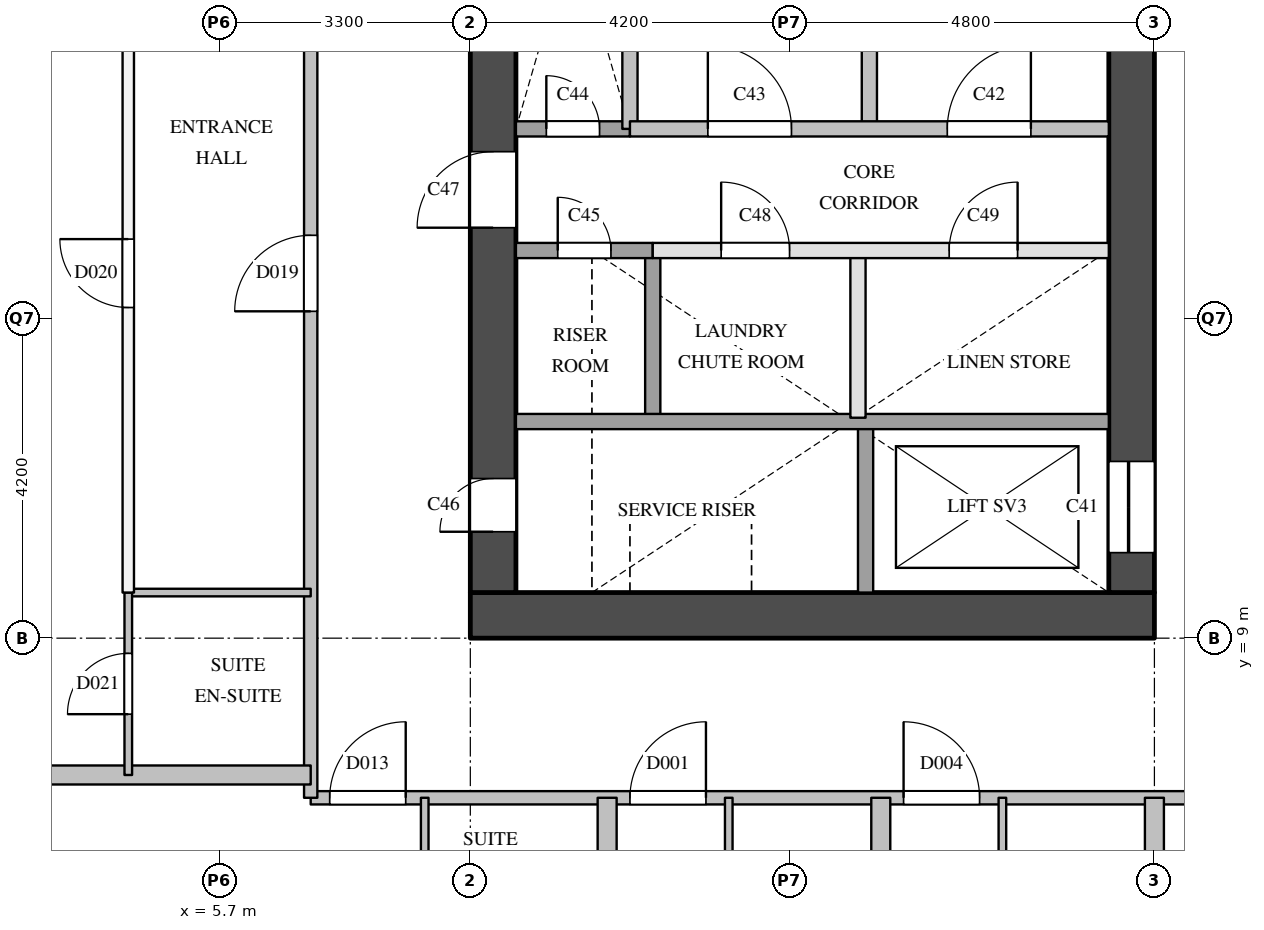
"""IFC4 building model, lengths in metres.
Left out: names, types, materials, properties, quantities, classifications, styles, units other than length and angle.
Written with IfcOpenShell. Run it as: python <this file> out.ifc"""

import sys

from ifc_helpers import new_model, si_unit, direction, frame, frame_2d, origin, place, context, subcontext, project, spatial, rectangle, extrude, element, fill, save


model = new_model("IFC4")
c1 = context("Model", 3, precision=1e-05, world=origin(), true_north=direction((0.0, 1.0)))
c2 = subcontext(c1, "Body", "Model", "MODEL_VIEW")
j1 = project(units=[si_unit("LENGTHUNIT", "METRE"), si_unit("PLANEANGLEUNIT", "RADIAN")], contexts=[c1])
p1 = place(None, origin())
s1 = spatial("IfcSite", under=j1, at=p1, CompositionType="ELEMENT")
p2 = place(p1, origin())
s2 = spatial("IfcBuilding", under=s1, at=p2, CompositionType="ELEMENT")
p3 = place(p2, frame((0.0, 0.0, 69.0)))
s3 = spatial("IfcBuildingStorey", under=s2, at=p3, CompositionType="ELEMENT", Elevation=69.0)
p4 = place(p3, frame((9.0, 9.3, 0.0), z_axis=(0.0, 0.0, 1.0), x_axis=(1.0, 0.0, 0.0)))
e1 = element("IfcWall", 1, at=p4, inside=s3, PredefinedType="SHEAR", context=c2, shape_type="SweptSolid", body=[
    extrude(rectangle(XDim=9.0, YDim=0.6, at=frame_2d((4.5, 0.0))), origin(), (0.0, 0.0, 1.0), 3.5),
])
p5 = place(p3, frame((9.3, 9.6, 0.0), z_axis=(0.0, 0.0, 1.0), x_axis=(0.0, 1.0, 0.0)))
e2 = element("IfcWall", 2, at=p5, inside=s3, PredefinedType="SHEAR", context=c2, shape_type="SweptSolid", body=[
    extrude(rectangle(XDim=12.3, YDim=0.6, at=frame_2d((6.15, 0.0))), origin(), (0.0, 0.0, 1.0), 3.5),
])
p6 = place(p5, frame((0.8, 0.0, 0.0)))
e3 = element("IfcOpeningElement", 3, at=p6, cuts=e2, PredefinedType="OPENING", context=c2, shape_type="SweptSolid", body=[
    extrude(rectangle(XDim=0.7, YDim=2.1, at=frame_2d((0.35, 1.05))), frame((0.0, 0.31, 0.0), z_axis=(0.0, -1.0, 0.0), x_axis=(1.0, 0.0, 0.0)), (0.0, 0.0, 1.0), 0.62),
])
p7 = place(p5, frame((4.8, 0.0, 0.0)))
e4 = element("IfcOpeningElement", 4, at=p7, cuts=e2, PredefinedType="OPENING", context=c2, shape_type="SweptSolid", body=[
    extrude(rectangle(XDim=1.0, YDim=2.1, at=frame_2d((0.5, 1.05))), frame((0.0, 0.31, 0.0), z_axis=(0.0, -1.0, 0.0), x_axis=(1.0, 0.0, 0.0)), (0.0, 0.0, 1.0), 0.62),
])
p8 = place(p3, frame((17.7, 9.6, 0.0), z_axis=(0.0, 0.0, 1.0), x_axis=(0.0, 1.0, 0.0)))
e5 = element("IfcWall", 5, at=p8, inside=s3, PredefinedType="SHEAR", context=c2, shape_type="SweptSolid", body=[
    extrude(rectangle(XDim=12.3, YDim=0.6, at=frame_2d((6.15, 0.0))), origin(), (0.0, 0.0, 1.0), 3.5),
])
p9 = place(p8, frame((0.525, 0.0, 0.0)))
e6 = element("IfcOpeningElement", 6, at=p9, cuts=e5, PredefinedType="OPENING", context=c2, shape_type="SweptSolid", body=[
    extrude(rectangle(XDim=1.2, YDim=2.1, at=frame_2d((0.6, 1.05))), frame((0.0, 0.31, 0.0), z_axis=(0.0, -1.0, 0.0), x_axis=(1.0, 0.0, 0.0)), (0.0, 0.0, 1.0), 0.62),
])
p10 = place(p3, frame((11.1, 15.7, 0.0), z_axis=(0.0, 0.0, 1.0), x_axis=(0.0, 1.0, 0.0)))
e7 = element("IfcWall", 7, at=p10, inside=s3, PredefinedType="SOLIDWALL", context=c2, shape_type="SweptSolid", body=[
    extrude(rectangle(XDim=4.3, YDim=0.2, at=frame_2d((2.15, 0.0))), origin(), (0.0, 0.0, 1.0), 3.5),
])
p11 = place(p3, frame((11.4, 11.9, 0.0), z_axis=(0.0, 0.0, 1.0), x_axis=(0.0, 1.0, 0.0)))
e8 = element("IfcWall", 8, at=p11, inside=s3, PredefinedType="SOLIDWALL", context=c2, shape_type="SweptSolid", body=[
    extrude(rectangle(XDim=2.2, YDim=0.2, at=frame_2d((1.1, 0.0))), origin(), (0.0, 0.0, 1.0), 3.5),
])
p12 = place(p3, frame((14.1, 11.9, 0.0), z_axis=(0.0, 0.0, 1.0), x_axis=(0.0, 1.0, 0.0)))
e9 = element("IfcWall", 9, at=p12, inside=s3, PredefinedType="PARTITIONING", context=c2, shape_type="SweptSolid", body=[
    extrude(rectangle(XDim=2.2, YDim=0.2, at=frame_2d((1.1, 0.0))), origin(), (0.0, 0.0, 1.0), 3.5),
])
p13 = place(p3, frame((14.2, 9.6, 0.0), z_axis=(0.0, 0.0, 1.0), x_axis=(0.0, 1.0, 0.0)))
e10 = element("IfcWall", 10, at=p13, inside=s3, PredefinedType="SOLIDWALL", context=c2, shape_type="SweptSolid", body=[
    extrude(rectangle(XDim=2.3, YDim=0.2, at=frame_2d((1.15, 0.0))), origin(), (0.0, 0.0, 1.0), 3.5),
])
p14 = place(p3, frame((14.25, 15.7, 0.0), z_axis=(0.0, 0.0, 1.0), x_axis=(0.0, 1.0, 0.0)))
e11 = element("IfcWall", 11, at=p14, inside=s3, PredefinedType="SOLIDWALL", context=c2, shape_type="SweptSolid", body=[
    extrude(rectangle(XDim=4.3, YDim=0.2, at=frame_2d((2.15, 0.0))), origin(), (0.0, 0.0, 1.0), 3.5),
])
p15 = place(p3, frame((9.6, 11.85, 0.0), z_axis=(0.0, 0.0, 1.0), x_axis=(1.0, 0.0, 0.0)))
e12 = element("IfcWall", 12, at=p15, inside=s3, PredefinedType="SOLIDWALL", context=c2, shape_type="SweptSolid", body=[
    extrude(rectangle(XDim=7.8, YDim=0.2, at=frame_2d((3.9, 0.0))), origin(), (0.0, 0.0, 1.0), 3.5),
])
p16 = place(p3, frame((11.4, 14.1, 0.0), z_axis=(0.0, 0.0, 1.0), x_axis=(1.0, 0.0, 0.0)))
e13 = element("IfcWall", 13, at=p16, inside=s3, PredefinedType="PARTITIONING", context=c2, shape_type="SweptSolid", body=[
    extrude(rectangle(XDim=6.0, YDim=0.2, at=frame_2d((3.0, 0.0))), origin(), (0.0, 0.0, 1.0), 3.5),
])
p17 = place(p16, frame((0.9, 0.0, 0.0)))
e14 = element("IfcOpeningElement", 14, at=p17, cuts=e13, PredefinedType="OPENING", context=c2, shape_type="SweptSolid", body=[
    extrude(rectangle(XDim=0.9, YDim=2.1, at=frame_2d((0.45, 1.05))), frame((0.0, 0.11, 0.0), z_axis=(0.0, -1.0, 0.0), x_axis=(1.0, 0.0, 0.0)), (0.0, 0.0, 1.0), 0.22),
])
p18 = place(p16, frame((3.9, 0.0, 0.0)))
e15 = element("IfcOpeningElement", 15, at=p18, cuts=e13, PredefinedType="OPENING", context=c2, shape_type="SweptSolid", body=[
    extrude(rectangle(XDim=0.9, YDim=2.1, at=frame_2d((0.45, 1.05))), frame((0.0, 0.11, 0.0), z_axis=(0.0, -1.0, 0.0), x_axis=(1.0, 0.0, 0.0)), (0.0, 0.0, 1.0), 0.22),
])
p19 = place(p3, frame((9.6, 14.1, 0.0), z_axis=(0.0, 0.0, 1.0), x_axis=(1.0, 0.0, 0.0)))
e16 = element("IfcWall", 16, at=p19, inside=s3, PredefinedType="SOLIDWALL", context=c2, shape_type="SweptSolid", body=[
    extrude(rectangle(XDim=1.8, YDim=0.2, at=frame_2d((0.9, 0.0))), origin(), (0.0, 0.0, 1.0), 3.5),
])
p20 = place(p19, frame((0.55, 0.0, 0.0)))
e17 = element("IfcOpeningElement", 17, at=p20, cuts=e16, PredefinedType="OPENING", context=c2, shape_type="SweptSolid", body=[
    extrude(rectangle(XDim=0.7, YDim=2.1, at=frame_2d((0.35, 1.05))), frame((0.0, 0.11, 0.0), z_axis=(0.0, -1.0, 0.0), x_axis=(1.0, 0.0, 0.0)), (0.0, 0.0, 1.0), 0.22),
])
p21 = place(p3, frame((9.6, 15.7, 0.0), z_axis=(0.0, 0.0, 1.0), x_axis=(1.0, 0.0, 0.0)))
e18 = element("IfcWall", 18, at=p21, inside=s3, PredefinedType="SOLIDWALL", context=c2, shape_type="SweptSolid", body=[
    extrude(rectangle(XDim=1.5, YDim=0.2, at=frame_2d((0.75, 0.0))), origin(), (0.0, 0.0, 1.0), 3.5),
])
p22 = place(p21, frame((0.4, 0.0, 0.0)))
e19 = element("IfcOpeningElement", 19, at=p22, cuts=e18, PredefinedType="OPENING", context=c2, shape_type="SweptSolid", body=[
    extrude(rectangle(XDim=0.7, YDim=2.1, at=frame_2d((0.35, 1.05))), frame((0.0, 0.11, 0.0), z_axis=(0.0, -1.0, 0.0), x_axis=(1.0, 0.0, 0.0)), (0.0, 0.0, 1.0), 0.22),
])
p23 = place(p3, frame((11.1, 15.7, 0.0), z_axis=(0.0, 0.0, 1.0), x_axis=(1.0, 0.0, 0.0)))
e20 = element("IfcWall", 20, at=p23, inside=s3, PredefinedType="SOLIDWALL", context=c2, shape_type="SweptSolid", body=[
    extrude(rectangle(XDim=6.3, YDim=0.2, at=frame_2d((3.15, 0.0))), origin(), (0.0, 0.0, 1.0), 3.5),
])
p24 = place(p23, frame((4.175, 0.0, 0.0)))
e21 = element("IfcOpeningElement", 21, at=p24, cuts=e20, PredefinedType="OPENING", context=c2, shape_type="SweptSolid", body=[
    extrude(rectangle(XDim=1.1, YDim=2.1, at=frame_2d((0.55, 1.05))), frame((0.0, 0.11, 0.0), z_axis=(0.0, -1.0, 0.0), x_axis=(1.0, 0.0, 0.0)), (0.0, 0.0, 1.0), 0.22),
])
p25 = place(p23, frame((1.025, 0.0, 0.0)))
e22 = element("IfcOpeningElement", 22, at=p25, cuts=e20, PredefinedType="OPENING", context=c2, shape_type="SweptSolid", body=[
    extrude(rectangle(XDim=1.1, YDim=2.1, at=frame_2d((0.55, 1.05))), frame((0.0, 0.11, 0.0), z_axis=(0.0, -1.0, 0.0), x_axis=(1.0, 0.0, 0.0)), (0.0, 0.0, 1.0), 0.22),
])
p26 = place(p3, frame((6.9, 6.9, 0.0), z_axis=(0.0, 0.0, 1.0), x_axis=(1.0, 0.0, 0.0)))
e23 = element("IfcWall", 23, at=p26, inside=s3, PredefinedType="PARTITIONING", context=c2, shape_type="SweptSolid", body=[
    extrude(rectangle(XDim=13.2, YDim=0.175, at=frame_2d((6.6, 0.0))), origin(), (0.0, 0.0, 1.0), 3.5),
])
p27 = place(p26, frame((4.2, 0.0, 0.0)))
e24 = element("IfcOpeningElement", 24, at=p27, cuts=e23, PredefinedType="OPENING", context=c2, shape_type="SweptSolid", body=[
    extrude(rectangle(XDim=1.0, YDim=2.1, at=frame_2d((0.5, 1.05))), frame((0.0, 0.097, 0.0), z_axis=(0.0, -1.0, 0.0), x_axis=(1.0, 0.0, 0.0)), (0.0, 0.0, 1.0), 0.195),
])
p28 = place(p26, frame((7.8, 0.0, 0.0)))
e25 = element("IfcOpeningElement", 25, at=p28, cuts=e23, PredefinedType="OPENING", context=c2, shape_type="SweptSolid", body=[
    extrude(rectangle(XDim=1.0, YDim=2.1, at=frame_2d((0.5, 1.05))), frame((0.0, 0.097, 0.0), z_axis=(0.0, -1.0, 0.0), x_axis=(1.0, 0.0, 0.0)), (0.0, 0.0, 1.0), 0.195),
])
p29 = place(p26, frame((11.65, 0.0, 0.0)))
e26 = element("IfcOpeningElement", 26, at=p29, cuts=e23, PredefinedType="OPENING", context=c2, shape_type="SweptSolid", body=[
    extrude(rectangle(XDim=1.0, YDim=2.1, at=frame_2d((0.5, 1.05))), frame((0.0, 0.097, 0.0), z_axis=(0.0, -1.0, 0.0), x_axis=(1.0, 0.0, 0.0)), (0.0, 0.0, 1.0), 0.195),
])
p30 = place(p26, frame((0.25, 0.0, 0.0)))
e27 = element("IfcOpeningElement", 27, at=p30, cuts=e23, PredefinedType="OPENING", context=c2, shape_type="SweptSolid", body=[
    extrude(rectangle(XDim=1.0, YDim=2.1, at=frame_2d((0.5, 1.05))), frame((0.0, 0.097, 0.0), z_axis=(0.0, -1.0, 0.0), x_axis=(1.0, 0.0, 0.0)), (0.0, 0.0, 1.0), 0.195),
])
p31 = place(p3, frame((6.9, 6.9, 0.0), z_axis=(0.0, 0.0, 1.0), x_axis=(0.0, 1.0, 0.0)))
e28 = element("IfcWall", 28, at=p31, inside=s3, PredefinedType="PARTITIONING", context=c2, shape_type="SweptSolid", body=[
    extrude(rectangle(XDim=17.09, YDim=0.175, at=frame_2d((8.545, 0.0))), origin(), (0.0, 0.0, 1.0), 3.5),
])
p32 = place(p31, frame((6.4, 0.0, 0.0)))
e29 = element("IfcOpeningElement", 29, at=p32, cuts=e28, PredefinedType="OPENING", context=c2, shape_type="SweptSolid", body=[
    extrude(rectangle(XDim=1.0, YDim=2.1, at=frame_2d((0.5, 1.05))), frame((0.0, 0.097, 0.0), z_axis=(0.0, -1.0, 0.0), x_axis=(1.0, 0.0, 0.0)), (0.0, 0.0, 1.0), 0.195),
])
p33 = place(p31, frame((14.795, 0.0, 0.0)))
e30 = element("IfcOpeningElement", 30, at=p33, cuts=e28, PredefinedType="OPENING", context=c2, shape_type="SweptSolid", body=[
    extrude(rectangle(XDim=1.0, YDim=2.1, at=frame_2d((0.5, 1.05))), frame((0.0, 0.097, 0.0), z_axis=(0.0, -1.0, 0.0), x_axis=(1.0, 0.0, 0.0)), (0.0, 0.0, 1.0), 0.195),
])
p34 = place(p3, frame((4.5, 9.6, 0.0), z_axis=(0.0, 0.0, 1.0), x_axis=(0.0, 1.0, 0.0)))
e31 = element("IfcWall", 31, at=p34, inside=s3, PredefinedType="PARTITIONING", context=c2, shape_type="SweptSolid", body=[
    extrude(rectangle(XDim=8.4, YDim=0.15, at=frame_2d((4.2, 0.0))), origin(), (0.0, 0.0, 1.0), 3.5),
])
p35 = place(p34, frame((3.75, 0.0, 0.0)))
e32 = element("IfcOpeningElement", 32, at=p35, cuts=e31, PredefinedType="OPENING", context=c2, shape_type="SweptSolid", body=[
    extrude(rectangle(XDim=0.9, YDim=2.1, at=frame_2d((0.45, 1.05))), frame((0.0, 0.085, 0.0), z_axis=(0.0, -1.0, 0.0), x_axis=(1.0, 0.0, 0.0)), (0.0, 0.0, 1.0), 0.17),
])
for number, where, z_axis, x_axis in (
    (33, (0.0, 7.2, 0.0), (0.0, 0.0, 1.0), (1.0, 0.0, 0.0)),
    (34, (10.8, 0.0, 0.0), (0.0, 0.0, 1.0), (0.0, 1.0, 0.0)),
    (35, (14.4, 0.0, 0.0), (0.0, 0.0, 1.0), (0.0, 1.0, 0.0)),
):
    element("IfcWall", number, at=place(p3, frame(where, z_axis=z_axis, x_axis=x_axis)), inside=s3, PredefinedType="PARTITIONING", context=c2, shape_type="SweptSolid", body=[
        extrude(rectangle(XDim=6.9, YDim=0.25, at=frame_2d((3.45, 0.0))), origin(), (0.0, 0.0, 1.0), 2.5),
    ])
p36 = place(p3, frame((18.0, 0.0, 0.0), z_axis=(0.0, 0.0, 1.0), x_axis=(0.0, 1.0, 0.0)))
e36 = element("IfcWall", 36, at=p36, inside=s3, PredefinedType="PARTITIONING", context=c2, shape_type="SweptSolid", body=[
    extrude(rectangle(XDim=6.9, YDim=0.25, at=frame_2d((3.45, 0.0))), origin(), (0.0, 0.0, 1.0), 3.5),
])
p37 = place(p3, frame((4.5, 9.6, 0.0), z_axis=(0.0, 0.0, 1.0), x_axis=(1.0, 0.0, 0.0)))
e37 = element("IfcWall", 37, at=p37, inside=s3, PredefinedType="PARTITIONING", context=c2, shape_type="SweptSolid", body=[
    extrude(rectangle(XDim=2.4, YDim=0.1, at=frame_2d((1.2, 0.0))), origin(), (0.0, 0.0, 1.0), 3.5),
])
p38 = place(p3, frame((4.5, 7.2, 0.0), z_axis=(0.0, 0.0, 1.0), x_axis=(0.0, 1.0, 0.0)))
e38 = element("IfcWall", 38, at=p38, inside=s3, PredefinedType="PARTITIONING", context=c2, shape_type="SweptSolid", body=[
    extrude(rectangle(XDim=2.4, YDim=0.1, at=frame_2d((1.2, 0.0))), origin(), (0.0, 0.0, 1.0), 3.5),
])
p39 = place(p38, frame((0.8, 0.0, 0.0)))
e39 = element("IfcOpeningElement", 39, at=p39, cuts=e38, PredefinedType="OPENING", context=c2, shape_type="SweptSolid", body=[
    extrude(rectangle(XDim=0.8, YDim=2.1, at=frame_2d((0.4, 1.05))), frame((0.0, 0.06, 0.0), z_axis=(0.0, -1.0, 0.0), x_axis=(1.0, 0.0, 0.0)), (0.0, 0.0, 1.0), 0.12),
])
p40 = place(p3, frame((8.4, 4.8, 0.0), z_axis=(0.0, 0.0, 1.0), x_axis=(0.0, 1.0, 0.0)))
e40 = element("IfcWall", 40, at=p40, inside=s3, PredefinedType="PARTITIONING", context=c2, shape_type="SweptSolid", body=[
    extrude(rectangle(XDim=2.1, YDim=0.1, at=frame_2d((1.05, 0.0))), origin(), (0.0, 0.0, 1.0), 3.5),
])
for number, where, z_axis, x_axis in (
    (41, (12.4, 4.5, 0.0), (0.0, 0.0, 1.0), (0.0, 1.0, 0.0)),
    (42, (16.0, 4.5, 0.0), (0.0, 0.0, 1.0), (0.0, 1.0, 0.0)),
):
    element("IfcWall", number, at=place(p3, frame(where, z_axis=z_axis, x_axis=x_axis)), inside=s3, PredefinedType="PARTITIONING", context=c2, shape_type="SweptSolid", body=[
        extrude(rectangle(XDim=2.4, YDim=0.1, at=frame_2d((1.2, 0.0))), origin(), (0.0, 0.0, 1.0), 3.5),
    ])
p41 = place(p9, origin())
e43 = element("IfcDoor", 43, at=p41, inside=s3, OperationType="SLIDING_TO_LEFT", PredefinedType="DOOR", context=c2, shape_type="SweptSolid", body=[
    extrude(rectangle(XDim=1.2, YDim=2.1, at=frame_2d((0.6, 1.05))), frame((0.0, 0.025, 0.0), z_axis=(0.0, -1.0, 0.0), x_axis=(1.0, 0.0, 0.0)), (0.0, 0.0, 1.0), 0.05),
])
fill(e6, e43)
p42 = place(p24, origin())
e44 = element("IfcDoor", 44, at=p42, inside=s3, OperationType="SINGLE_SWING_RIGHT", PredefinedType="DOOR", context=c2, shape_type="SweptSolid", body=[
    extrude(rectangle(XDim=1.1, YDim=2.1, at=frame_2d((0.55, 1.05))), frame((0.0, 0.025, 0.0), z_axis=(0.0, -1.0, 0.0), x_axis=(1.0, 0.0, 0.0)), (0.0, 0.0, 1.0), 0.05),
])
fill(e21, e44)
p43 = place(p25, origin())
e45 = element("IfcDoor", 45, at=p43, inside=s3, OperationType="SINGLE_SWING_LEFT", PredefinedType="DOOR", context=c2, shape_type="SweptSolid", body=[
    extrude(rectangle(XDim=1.1, YDim=2.1, at=frame_2d((0.55, 1.05))), frame((0.0, 0.025, 0.0), z_axis=(0.0, -1.0, 0.0), x_axis=(1.0, 0.0, 0.0)), (0.0, 0.0, 1.0), 0.05),
])
fill(e22, e45)
p44 = place(p22, origin())
e46 = element("IfcDoor", 46, at=p44, inside=s3, OperationType="SINGLE_SWING_LEFT", PredefinedType="DOOR", context=c2, shape_type="SweptSolid", body=[
    extrude(rectangle(XDim=0.7, YDim=2.1, at=frame_2d((0.35, 1.05))), frame((0.0, 0.025, 0.0), z_axis=(0.0, -1.0, 0.0), x_axis=(1.0, 0.0, 0.0)), (0.0, 0.0, 1.0), 0.05),
])
fill(e19, e46)
p45 = place(p20, origin())
e47 = element("IfcDoor", 47, at=p45, inside=s3, OperationType="SINGLE_SWING_LEFT", PredefinedType="DOOR", context=c2, shape_type="SweptSolid", body=[
    extrude(rectangle(XDim=0.7, YDim=2.1, at=frame_2d((0.35, 1.05))), frame((0.0, 0.025, 0.0), z_axis=(0.0, -1.0, 0.0), x_axis=(1.0, 0.0, 0.0)), (0.0, 0.0, 1.0), 0.05),
])
fill(e17, e47)
p46 = place(p6, origin())
e48 = element("IfcDoor", 48, at=p46, inside=s3, OperationType="SINGLE_SWING_LEFT", PredefinedType="DOOR", context=c2, shape_type="SweptSolid", body=[
    extrude(rectangle(XDim=0.7, YDim=2.1, at=frame_2d((0.35, 1.05))), frame((0.0, 0.025, 0.0), z_axis=(0.0, -1.0, 0.0), x_axis=(1.0, 0.0, 0.0)), (0.0, 0.0, 1.0), 0.05),
])
fill(e3, e48)
p47 = place(p7, origin())
e49 = element("IfcDoor", 49, at=p47, inside=s3, OperationType="SINGLE_SWING_LEFT", PredefinedType="DOOR", context=c2, shape_type="SweptSolid", body=[
    extrude(rectangle(XDim=1.0, YDim=2.1, at=frame_2d((0.5, 1.05))), frame((0.0, 0.025, 0.0), z_axis=(0.0, -1.0, 0.0), x_axis=(1.0, 0.0, 0.0)), (0.0, 0.0, 1.0), 0.05),
])
fill(e4, e49)
p48 = place(p17, origin())
e50 = element("IfcDoor", 50, at=p48, inside=s3, OperationType="SINGLE_SWING_LEFT", PredefinedType="DOOR", context=c2, shape_type="SweptSolid", body=[
    extrude(rectangle(XDim=0.9, YDim=2.1, at=frame_2d((0.45, 1.05))), frame((0.0, 0.025, 0.0), z_axis=(0.0, -1.0, 0.0), x_axis=(1.0, 0.0, 0.0)), (0.0, 0.0, 1.0), 0.05),
])
fill(e14, e50)
p49 = place(p18, origin())
e51 = element("IfcDoor", 51, at=p49, inside=s3, OperationType="SINGLE_SWING_RIGHT", PredefinedType="DOOR", context=c2, shape_type="SweptSolid", body=[
    extrude(rectangle(XDim=0.9, YDim=2.1, at=frame_2d((0.45, 1.05))), frame((0.0, 0.025, 0.0), z_axis=(0.0, -1.0, 0.0), x_axis=(1.0, 0.0, 0.0)), (0.0, 0.0, 1.0), 0.05),
])
fill(e15, e51)
p50 = place(p27, origin())
e52 = element("IfcDoor", 52, at=p50, inside=s3, OperationType="SINGLE_SWING_RIGHT", PredefinedType="DOOR", context=c2, shape_type="SweptSolid", body=[
    extrude(rectangle(XDim=1.0, YDim=2.1, at=frame_2d((0.5, 1.05))), frame((0.0, 0.025, 0.0), z_axis=(0.0, -1.0, 0.0), x_axis=(1.0, 0.0, 0.0)), (0.0, 0.0, 1.0), 0.05),
])
fill(e24, e52)
p51 = place(p28, origin())
e53 = element("IfcDoor", 53, at=p51, inside=s3, OperationType="SINGLE_SWING_LEFT", PredefinedType="DOOR", context=c2, shape_type="SweptSolid", body=[
    extrude(rectangle(XDim=1.0, YDim=2.1, at=frame_2d((0.5, 1.05))), frame((0.0, 0.025, 0.0), z_axis=(0.0, -1.0, 0.0), x_axis=(1.0, 0.0, 0.0)), (0.0, 0.0, 1.0), 0.05),
])
fill(e25, e53)
p52 = place(p30, origin())
e54 = element("IfcDoor", 54, at=p52, inside=s3, OperationType="SINGLE_SWING_RIGHT", PredefinedType="DOOR", context=c2, shape_type="SweptSolid", body=[
    extrude(rectangle(XDim=1.0, YDim=2.1, at=frame_2d((0.5, 1.05))), frame((0.0, 0.025, 0.0), z_axis=(0.0, -1.0, 0.0), x_axis=(1.0, 0.0, 0.0)), (0.0, 0.0, 1.0), 0.05),
])
fill(e27, e54)
p53 = place(p32, origin())
e55 = element("IfcDoor", 55, at=p53, inside=s3, OperationType="SINGLE_SWING_LEFT", PredefinedType="DOOR", context=c2, shape_type="SweptSolid", body=[
    extrude(rectangle(XDim=1.0, YDim=2.1, at=frame_2d((0.5, 1.05))), frame((0.0, 0.025, 0.0), z_axis=(0.0, -1.0, 0.0), x_axis=(1.0, 0.0, 0.0)), (0.0, 0.0, 1.0), 0.05),
])
fill(e29, e55)
p54 = place(p35, origin())
e56 = element("IfcDoor", 56, at=p54, inside=s3, OperationType="SINGLE_SWING_RIGHT", PredefinedType="DOOR", context=c2, shape_type="SweptSolid", body=[
    extrude(rectangle(XDim=0.9, YDim=2.1, at=frame_2d((0.45, 1.05))), frame((0.0, 0.025, 0.0), z_axis=(0.0, -1.0, 0.0), x_axis=(1.0, 0.0, 0.0)), (0.0, 0.0, 1.0), 0.05),
])
fill(e32, e56)
p55 = place(p39, origin())
e57 = element("IfcDoor", 57, at=p55, inside=s3, OperationType="SINGLE_SWING_LEFT", PredefinedType="DOOR", context=c2, shape_type="SweptSolid", body=[
    extrude(rectangle(XDim=0.8, YDim=2.1, at=frame_2d((0.4, 1.05))), frame((0.0, 0.025, 0.0), z_axis=(0.0, -1.0, 0.0), x_axis=(1.0, 0.0, 0.0)), (0.0, 0.0, 1.0), 0.05),
])
fill(e39, e57)
save(model, sys.argv[1])
